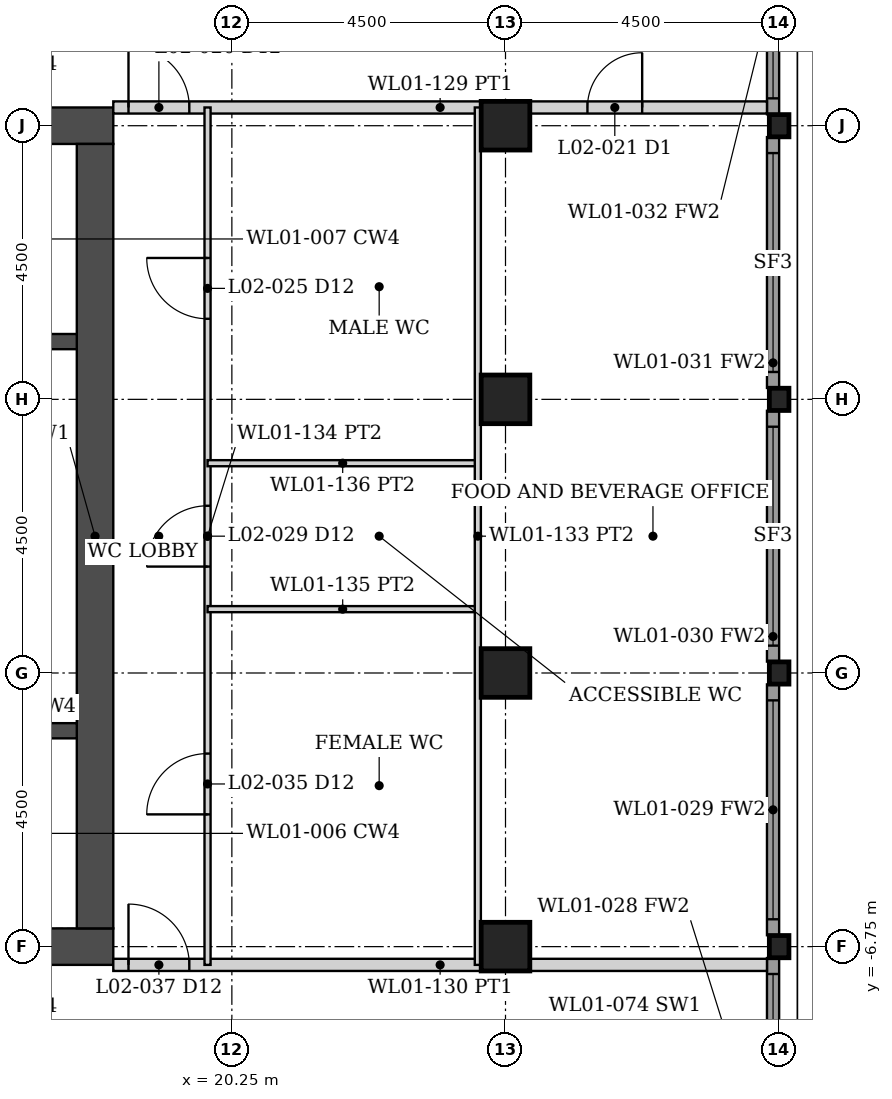
"""IFC4 building model, lengths in metres.
Left out: names, types, materials, properties, quantities, classifications, styles, units other than length and angle.
Written with IfcOpenShell. Run it as: python <this file> out.ifc"""

import sys

from ifc_helpers import new_model, si_unit, direction, frame, frame_2d, origin, origin_2d, place, context, subcontext, project, spatial, rectangle, hollow_rectangle, i_section, extrude, element, fill, save


model = new_model("IFC4")
c1 = context("Model", 3, precision=1e-05, world=origin(), true_north=direction((0.0, 1.0)))
c2 = subcontext(c1, "Body", "Model", "MODEL_VIEW")
j1 = project(units=[si_unit("LENGTHUNIT", "METRE"), si_unit("PLANEANGLEUNIT", "RADIAN")], contexts=[c1])
p1 = place(None, origin())
s1 = spatial("IfcSite", under=j1, at=p1, CompositionType="ELEMENT")
p2 = place(p1, origin())
s2 = spatial("IfcBuilding", under=s1, at=p2, CompositionType="ELEMENT")
p3 = place(p2, frame((0.0, 0.0, 11.0)))
s3 = spatial("IfcBuildingStorey", under=s2, at=p3, CompositionType="ELEMENT", Elevation=11.0)
for number, where, z_axis, x_axis in (
    (1, (24.75, -6.75, 0.0), (0.0, 0.0, 1.0), (1.0, 0.0, 0.0)),
    (2, (24.75, -2.25, 0.0), (0.0, 0.0, 1.0), (1.0, 0.0, 0.0)),
    (3, (24.75, 2.25, 0.0), (0.0, 0.0, 1.0), (1.0, 0.0, 0.0)),
    (4, (24.75, 6.75, 0.0), (0.0, 0.0, 1.0), (1.0, 0.0, 0.0)),
):
    element("IfcColumn", number, at=place(p3, frame(where, z_axis=z_axis, x_axis=x_axis)), inside=s3, PredefinedType="COLUMN", context=c2, shape_type="SweptSolid", body=[
        extrude(hollow_rectangle(XDim=0.8, YDim=0.8, WallThickness=0.08, at=origin_2d()), origin(), (0.0, 0.0, 1.0), 5.0),
    ])
for number, where, z_axis, x_axis in (
    (5, (29.25, -6.75, 0.0), (0.0, 0.0, 1.0), (1.0, 0.0, 0.0)),
    (6, (29.25, -2.25, 0.0), (0.0, 0.0, 1.0), (1.0, 0.0, 0.0)),
    (7, (29.25, 2.25, 0.0), (0.0, 0.0, 1.0), (1.0, 0.0, 0.0)),
    (8, (29.25, 6.75, 0.0), (0.0, 0.0, 1.0), (1.0, 0.0, 0.0)),
):
    element("IfcColumn", number, at=place(p3, frame(where, z_axis=z_axis, x_axis=x_axis)), inside=s3, PredefinedType="COLUMN", context=c2, shape_type="SweptSolid", body=[
        extrude(i_section(OverallWidth=0.322, OverallDepth=0.365, WebThickness=0.027, FlangeThickness=0.044, FilletRadius=0.015, at=origin_2d()), origin(), (0.0, 0.0, 1.0), 5.0),
    ])
for number, where, z_axis, x_axis in (
    (9, (8.7, -6.75, 0.0), (0.0, 0.0, 1.0), (1.0, 0.0, 0.0)),
    (10, (8.7, 6.75, 0.0), (0.0, 0.0, 1.0), (1.0, 0.0, 0.0)),
):
    element("IfcWall", number, at=place(p3, frame(where, z_axis=z_axis, x_axis=x_axis)), inside=s3, PredefinedType="SHEAR", context=c2, shape_type="SweptSolid", body=[
        extrude(rectangle(XDim=9.6, YDim=0.6, at=frame_2d((4.8, 0.0))), origin(), (0.0, 0.0, 1.0), 5.0),
    ])
p4 = place(p3, frame((18.0, -6.45, 0.0), z_axis=(0.0, 0.0, 1.0), x_axis=(0.0, 1.0, 0.0)))
e11 = element("IfcWall", 11, at=p4, inside=s3, PredefinedType="SHEAR", context=c2, shape_type="SweptSolid", body=[
    extrude(rectangle(XDim=12.9, YDim=0.6, at=frame_2d((6.45, 0.0))), origin(), (0.0, 0.0, 1.0), 5.0),
])
p5 = place(p3, frame((9.3, -3.2, 0.0), z_axis=(0.0, 0.0, 1.0), x_axis=(1.0, 0.0, 0.0)))
e12 = element("IfcWall", 12, at=p5, inside=s3, PredefinedType="SHEAR", context=c2, shape_type="SweptSolid", body=[
    extrude(rectangle(XDim=8.4, YDim=0.25, at=frame_2d((4.2, 0.0))), origin(), (0.0, 0.0, 1.0), 5.0),
])
p6 = place(p5, frame((0.15, 0.0, 0.0)))
e13 = element("IfcOpeningElement", 13, at=p6, cuts=e12, PredefinedType="OPENING", context=c2, shape_type="SweptSolid", body=[
    extrude(rectangle(XDim=1.0, YDim=2.1, at=frame_2d((0.5, 1.05))), frame((0.0, 0.135, 0.0), z_axis=(0.0, -1.0, 0.0), x_axis=(1.0, 0.0, 0.0)), (0.0, 0.0, 1.0), 0.27),
])
p7 = place(p3, frame((9.3, 3.2, 0.0), z_axis=(0.0, 0.0, 1.0), x_axis=(1.0, 0.0, 0.0)))
e14 = element("IfcWall", 14, at=p7, inside=s3, PredefinedType="SHEAR", context=c2, shape_type="SweptSolid", body=[
    extrude(rectangle(XDim=8.4, YDim=0.25, at=frame_2d((4.2, 0.0))), origin(), (0.0, 0.0, 1.0), 5.0),
])
p8 = place(p3, frame((29.15, -11.062, 0.0), z_axis=(0.0, 0.0, 1.0), x_axis=(0.0, 1.0, 0.0)))
e15 = element("IfcWall", 15, at=p8, inside=s3, PredefinedType="SOLIDWALL", context=c2, shape_type="SweptSolid", body=[
    extrude(rectangle(XDim=4.125, YDim=0.2, at=frame_2d((2.062, 0.0))), origin(), (0.0, 0.0, 1.0), 4.133),
])
p9 = place(p8, frame((0.262, 0.0, 0.15)))
e16 = element("IfcOpeningElement", 16, at=p9, cuts=e15, PredefinedType="OPENING", context=c2, shape_type="SweptSolid", body=[
    extrude(rectangle(XDim=3.6, YDim=3.833, at=frame_2d((1.8, 1.917))), frame((0.0, 0.11, 0.0), z_axis=(0.0, -1.0, 0.0), x_axis=(1.0, 0.0, 0.0)), (0.0, 0.0, 1.0), 0.22),
])
p10 = place(p3, frame((29.15, -6.562, 0.0), z_axis=(0.0, 0.0, 1.0), x_axis=(0.0, 1.0, 0.0)))
e17 = element("IfcWall", 17, at=p10, inside=s3, PredefinedType="SOLIDWALL", context=c2, shape_type="SweptSolid", body=[
    extrude(rectangle(XDim=4.125, YDim=0.2, at=frame_2d((2.062, 0.0))), origin(), (0.0, 0.0, 1.0), 4.133),
])
p11 = place(p10, frame((0.262, 0.0, 0.15)))
e18 = element("IfcOpeningElement", 18, at=p11, cuts=e17, PredefinedType="OPENING", context=c2, shape_type="SweptSolid", body=[
    extrude(rectangle(XDim=3.6, YDim=3.833, at=frame_2d((1.8, 1.917))), frame((0.0, 0.11, 0.0), z_axis=(0.0, -1.0, 0.0), x_axis=(1.0, 0.0, 0.0)), (0.0, 0.0, 1.0), 0.22),
])
p12 = place(p3, frame((29.15, -2.062, 0.0), z_axis=(0.0, 0.0, 1.0), x_axis=(0.0, 1.0, 0.0)))
e19 = element("IfcWall", 19, at=p12, inside=s3, PredefinedType="SOLIDWALL", context=c2, shape_type="SweptSolid", body=[
    extrude(rectangle(XDim=4.125, YDim=0.2, at=frame_2d((2.062, 0.0))), origin(), (0.0, 0.0, 1.0), 4.133),
])
p13 = place(p12, frame((0.262, 0.0, 0.15)))
e20 = element("IfcOpeningElement", 20, at=p13, cuts=e19, PredefinedType="OPENING", context=c2, shape_type="SweptSolid", body=[
    extrude(rectangle(XDim=3.6, YDim=3.833, at=frame_2d((1.8, 1.917))), frame((0.0, 0.11, 0.0), z_axis=(0.0, -1.0, 0.0), x_axis=(1.0, 0.0, 0.0)), (0.0, 0.0, 1.0), 0.22),
])
p14 = place(p3, frame((29.15, 2.438, 0.0), z_axis=(0.0, 0.0, 1.0), x_axis=(0.0, 1.0, 0.0)))
e21 = element("IfcWall", 21, at=p14, inside=s3, PredefinedType="SOLIDWALL", context=c2, shape_type="SweptSolid", body=[
    extrude(rectangle(XDim=4.125, YDim=0.2, at=frame_2d((2.062, 0.0))), origin(), (0.0, 0.0, 1.0), 4.133),
])
p15 = place(p14, frame((0.262, 0.0, 0.15)))
e22 = element("IfcOpeningElement", 22, at=p15, cuts=e21, PredefinedType="OPENING", context=c2, shape_type="SweptSolid", body=[
    extrude(rectangle(XDim=3.6, YDim=3.833, at=frame_2d((1.8, 1.917))), frame((0.0, 0.11, 0.0), z_axis=(0.0, -1.0, 0.0), x_axis=(1.0, 0.0, 0.0)), (0.0, 0.0, 1.0), 0.22),
])
p16 = place(p3, frame((29.15, 6.938, 0.0), z_axis=(0.0, 0.0, 1.0), x_axis=(0.0, 1.0, 0.0)))
e23 = element("IfcWall", 23, at=p16, inside=s3, PredefinedType="SOLIDWALL", context=c2, shape_type="SweptSolid", body=[
    extrude(rectangle(XDim=4.125, YDim=0.2, at=frame_2d((2.062, 0.0))), origin(), (0.0, 0.0, 1.0), 4.133),
])
p17 = place(p16, frame((0.262, 0.0, 0.15)))
e24 = element("IfcOpeningElement", 24, at=p17, cuts=e23, PredefinedType="OPENING", context=c2, shape_type="SweptSolid", body=[
    extrude(rectangle(XDim=3.6, YDim=3.833, at=frame_2d((1.8, 1.917))), frame((0.0, 0.11, 0.0), z_axis=(0.0, -1.0, 0.0), x_axis=(1.0, 0.0, 0.0)), (0.0, 0.0, 1.0), 0.22),
])
p18 = place(p3, frame((18.3, 7.05, 0.0), z_axis=(0.0, 0.0, 1.0), x_axis=(1.0, 0.0, 0.0)))
e25 = element("IfcWall", 25, at=p18, inside=s3, PredefinedType="PARTITIONING", context=c2, shape_type="SweptSolid", body=[
    extrude(rectangle(XDim=10.75, YDim=0.2, at=frame_2d((5.375, 0.0))), origin(), (0.0, 0.0, 1.0), 3.829),
])
p19 = place(p18, frame((7.798, 0.0, 0.0)))
e26 = element("IfcOpeningElement", 26, at=p19, cuts=e25, PredefinedType="OPENING", context=c2, shape_type="SweptSolid", body=[
    extrude(rectangle(XDim=0.9, YDim=2.1, at=frame_2d((0.45, 1.05))), frame((0.0, 0.11, 0.0), z_axis=(0.0, -1.0, 0.0), x_axis=(1.0, 0.0, 0.0)), (0.0, 0.0, 1.0), 0.22),
])
p20 = place(p18, frame((0.25, 0.0, 0.0)))
e27 = element("IfcOpeningElement", 27, at=p20, cuts=e25, PredefinedType="OPENING", context=c2, shape_type="SweptSolid", body=[
    extrude(rectangle(XDim=1.0, YDim=2.1, at=frame_2d((0.5, 1.05))), frame((0.0, 0.11, 0.0), z_axis=(0.0, -1.0, 0.0), x_axis=(1.0, 0.0, 0.0)), (0.0, 0.0, 1.0), 0.22),
])
p21 = place(p3, frame((18.3, -7.05, 0.0), z_axis=(0.0, 0.0, 1.0), x_axis=(1.0, 0.0, 0.0)))
e28 = element("IfcWall", 28, at=p21, inside=s3, PredefinedType="PARTITIONING", context=c2, shape_type="SweptSolid", body=[
    extrude(rectangle(XDim=10.75, YDim=0.2, at=frame_2d((5.375, 0.0))), origin(), (0.0, 0.0, 1.0), 3.829),
])
p22 = place(p21, frame((0.25, 0.0, 0.0)))
e29 = element("IfcOpeningElement", 29, at=p22, cuts=e28, PredefinedType="OPENING", context=c2, shape_type="SweptSolid", body=[
    extrude(rectangle(XDim=1.0, YDim=2.1, at=frame_2d((0.5, 1.05))), frame((0.0, 0.11, 0.0), z_axis=(0.0, -1.0, 0.0), x_axis=(1.0, 0.0, 0.0)), (0.0, 0.0, 1.0), 0.22),
])
p23 = place(p3, frame((19.85, -7.05, 0.0), z_axis=(0.0, 0.0, 1.0), x_axis=(0.0, 1.0, 0.0)))
e30 = element("IfcWall", 30, at=p23, inside=s3, PredefinedType="PARTITIONING", context=c2, shape_type="SweptSolid", body=[
    extrude(rectangle(XDim=14.1, YDim=0.1, at=frame_2d((7.05, 0.0))), origin(), (0.0, 0.0, 1.0), 3.829),
])
p24 = place(p23, frame((2.475, 0.0, 0.0)))
e31 = element("IfcOpeningElement", 31, at=p24, cuts=e30, PredefinedType="OPENING", context=c2, shape_type="SweptSolid", body=[
    extrude(rectangle(XDim=1.0, YDim=2.1, at=frame_2d((0.5, 1.05))), frame((0.0, 0.06, 0.0), z_axis=(0.0, -1.0, 0.0), x_axis=(1.0, 0.0, 0.0)), (0.0, 0.0, 1.0), 0.12),
])
p25 = place(p23, frame((6.55, 0.0, 0.0)))
e32 = element("IfcOpeningElement", 32, at=p25, cuts=e30, PredefinedType="OPENING", context=c2, shape_type="SweptSolid", body=[
    extrude(rectangle(XDim=1.0, YDim=2.1, at=frame_2d((0.5, 1.05))), frame((0.0, 0.06, 0.0), z_axis=(0.0, -1.0, 0.0), x_axis=(1.0, 0.0, 0.0)), (0.0, 0.0, 1.0), 0.12),
])
p26 = place(p23, frame((10.625, 0.0, 0.0)))
e33 = element("IfcOpeningElement", 33, at=p26, cuts=e30, PredefinedType="OPENING", context=c2, shape_type="SweptSolid", body=[
    extrude(rectangle(XDim=1.0, YDim=2.1, at=frame_2d((0.5, 1.05))), frame((0.0, 0.06, 0.0), z_axis=(0.0, -1.0, 0.0), x_axis=(1.0, 0.0, 0.0)), (0.0, 0.0, 1.0), 0.12),
])
for number, where, z_axis, x_axis in (
    (34, (19.85, -1.2, 0.0), (0.0, 0.0, 1.0), (1.0, 0.0, 0.0)),
    (35, (19.85, 1.2, 0.0), (0.0, 0.0, 1.0), (1.0, 0.0, 0.0)),
):
    element("IfcWall", number, at=place(p3, frame(where, z_axis=z_axis, x_axis=x_axis)), inside=s3, PredefinedType="PARTITIONING", context=c2, shape_type="SweptSolid", body=[
        extrude(rectangle(XDim=4.445, YDim=0.1, at=frame_2d((2.222, 0.0))), origin(), (0.0, 0.0, 1.0), 3.829),
    ])
p27 = place(p3, frame((24.295, -7.05, 0.0), z_axis=(0.0, 0.0, 1.0), x_axis=(0.0, 1.0, 0.0)))
e36 = element("IfcWall", 36, at=p27, inside=s3, PredefinedType="PARTITIONING", context=c2, shape_type="SweptSolid", body=[
    extrude(rectangle(XDim=14.1, YDim=0.1, at=frame_2d((7.05, 0.0))), origin(), (0.0, 0.0, 1.0), 3.829),
])
p28 = place(p9, origin())
e37 = element("IfcWindow", 37, at=p28, inside=s3, PartitioningType="SINGLE_PANEL", PredefinedType="WINDOW", context=c2, shape_type="SweptSolid", body=[
    extrude(rectangle(XDim=3.6, YDim=3.833, at=frame_2d((1.8, 1.917))), frame((0.0, 0.03, 0.0), z_axis=(0.0, -1.0, 0.0), x_axis=(1.0, 0.0, 0.0)), (0.0, 0.0, 1.0), 0.06),
])
fill(e16, e37)
p29 = place(p11, origin())
e38 = element("IfcWindow", 38, at=p29, inside=s3, PartitioningType="SINGLE_PANEL", PredefinedType="WINDOW", context=c2, shape_type="SweptSolid", body=[
    extrude(rectangle(XDim=3.6, YDim=3.833, at=frame_2d((1.8, 1.917))), frame((0.0, 0.03, 0.0), z_axis=(0.0, -1.0, 0.0), x_axis=(1.0, 0.0, 0.0)), (0.0, 0.0, 1.0), 0.06),
])
fill(e18, e38)
p30 = place(p13, origin())
e39 = element("IfcWindow", 39, at=p30, inside=s3, PartitioningType="SINGLE_PANEL", PredefinedType="WINDOW", context=c2, shape_type="SweptSolid", body=[
    extrude(rectangle(XDim=3.6, YDim=3.833, at=frame_2d((1.8, 1.917))), frame((0.0, 0.03, 0.0), z_axis=(0.0, -1.0, 0.0), x_axis=(1.0, 0.0, 0.0)), (0.0, 0.0, 1.0), 0.06),
])
fill(e20, e39)
p31 = place(p15, origin())
e40 = element("IfcWindow", 40, at=p31, inside=s3, PartitioningType="SINGLE_PANEL", PredefinedType="WINDOW", context=c2, shape_type="SweptSolid", body=[
    extrude(rectangle(XDim=3.6, YDim=3.833, at=frame_2d((1.8, 1.917))), frame((0.0, 0.03, 0.0), z_axis=(0.0, -1.0, 0.0), x_axis=(1.0, 0.0, 0.0)), (0.0, 0.0, 1.0), 0.06),
])
fill(e22, e40)
p32 = place(p17, origin())
e41 = element("IfcWindow", 41, at=p32, inside=s3, PartitioningType="SINGLE_PANEL", PredefinedType="WINDOW", context=c2, shape_type="SweptSolid", body=[
    extrude(rectangle(XDim=3.6, YDim=3.833, at=frame_2d((1.8, 1.917))), frame((0.0, 0.03, 0.0), z_axis=(0.0, -1.0, 0.0), x_axis=(1.0, 0.0, 0.0)), (0.0, 0.0, 1.0), 0.06),
])
fill(e24, e41)
p33 = place(p24, origin())
e42 = element("IfcDoor", 42, at=p33, inside=s3, OperationType="SINGLE_SWING_LEFT", PredefinedType="DOOR", context=c2, shape_type="SweptSolid", body=[
    extrude(rectangle(XDim=1.0, YDim=2.1, at=frame_2d((0.5, 1.05))), frame((0.0, 0.025, 0.0), z_axis=(0.0, -1.0, 0.0), x_axis=(1.0, 0.0, 0.0)), (0.0, 0.0, 1.0), 0.05),
])
fill(e31, e42)
p34 = place(p25, origin())
e43 = element("IfcDoor", 43, at=p34, inside=s3, OperationType="SINGLE_SWING_LEFT", PredefinedType="DOOR", context=c2, shape_type="SweptSolid", body=[
    extrude(rectangle(XDim=1.0, YDim=2.1, at=frame_2d((0.5, 1.05))), frame((0.0, 0.025, 0.0), z_axis=(0.0, -1.0, 0.0), x_axis=(1.0, 0.0, 0.0)), (0.0, 0.0, 1.0), 0.05),
])
fill(e32, e43)
p35 = place(p26, origin())
e44 = element("IfcDoor", 44, at=p35, inside=s3, OperationType="SINGLE_SWING_RIGHT", PredefinedType="DOOR", context=c2, shape_type="SweptSolid", body=[
    extrude(rectangle(XDim=1.0, YDim=2.1, at=frame_2d((0.5, 1.05))), frame((0.0, 0.025, 0.0), z_axis=(0.0, -1.0, 0.0), x_axis=(1.0, 0.0, 0.0)), (0.0, 0.0, 1.0), 0.05),
])
fill(e33, e44)
p36 = place(p19, origin())
e45 = element("IfcDoor", 45, at=p36, inside=s3, OperationType="SINGLE_SWING_RIGHT", PredefinedType="DOOR", context=c2, shape_type="SweptSolid", body=[
    extrude(rectangle(XDim=0.9, YDim=2.1, at=frame_2d((0.45, 1.05))), frame((0.0, 0.025, 0.0), z_axis=(0.0, -1.0, 0.0), x_axis=(1.0, 0.0, 0.0)), (0.0, 0.0, 1.0), 0.05),
])
fill(e26, e45)
p37 = place(p20, origin())
e46 = element("IfcDoor", 46, at=p37, inside=s3, OperationType="SINGLE_SWING_LEFT", PredefinedType="DOOR", context=c2, shape_type="SweptSolid", body=[
    extrude(rectangle(XDim=1.0, YDim=2.1, at=frame_2d((0.5, 1.05))), frame((0.0, 0.025, 0.0), z_axis=(0.0, -1.0, 0.0), x_axis=(1.0, 0.0, 0.0)), (0.0, 0.0, 1.0), 0.05),
])
fill(e27, e46)
p38 = place(p22, origin())
e47 = element("IfcDoor", 47, at=p38, inside=s3, OperationType="SINGLE_SWING_LEFT", PredefinedType="DOOR", context=c2, shape_type="SweptSolid", body=[
    extrude(rectangle(XDim=1.0, YDim=2.1, at=frame_2d((0.5, 1.05))), frame((0.0, 0.025, 0.0), z_axis=(0.0, -1.0, 0.0), x_axis=(1.0, 0.0, 0.0)), (0.0, 0.0, 1.0), 0.05),
])
fill(e29, e47)
save(model, sys.argv[1])
